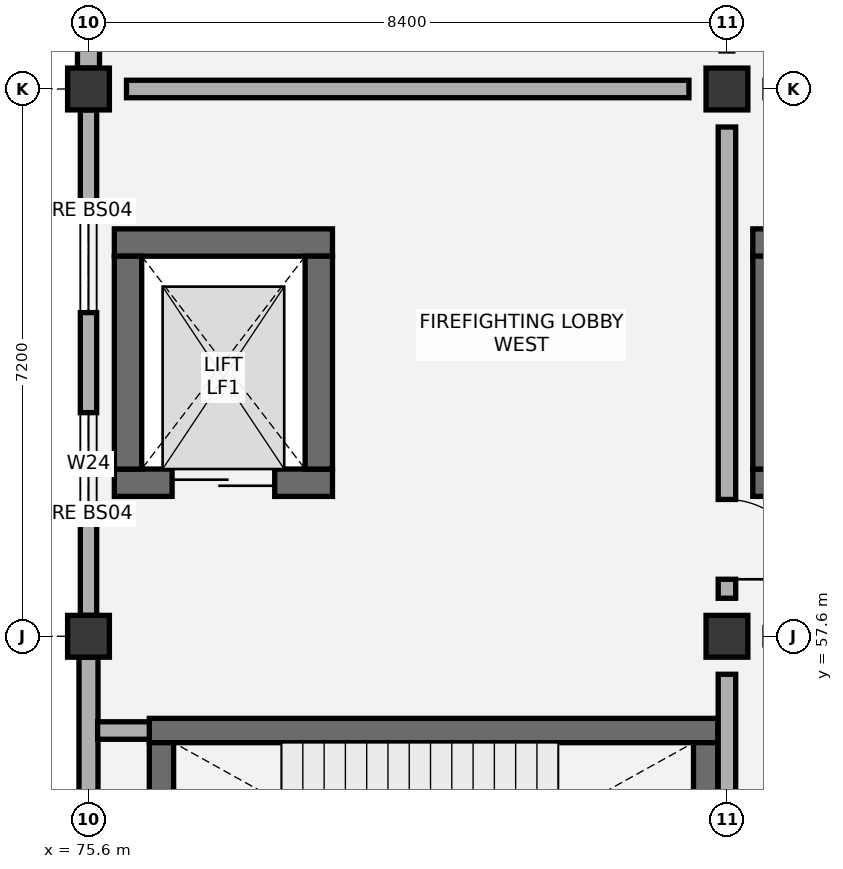
"""IFC4 building model, lengths in metres.
Left out: names, types, materials, properties, quantities, classifications, styles, units other than length and angle.
Written with IfcOpenShell. Run it as: python <this file> out.ifc"""

import sys

from ifc_helpers import new_model, si_unit, direction, frame, frame_2d, origin, origin_2d, place, context, subcontext, project, spatial, rectangle, extrude, element, fill, save


model = new_model("IFC4")
c1 = context("Model", 3, precision=1e-05, world=origin(), true_north=direction((0.0, 1.0)))
c2 = subcontext(c1, "Body", "Model", "MODEL_VIEW")
j1 = project(units=[si_unit("LENGTHUNIT", "METRE"), si_unit("PLANEANGLEUNIT", "RADIAN")], contexts=[c1])
p1 = place(None, origin())
s1 = spatial("IfcSite", under=j1, at=p1, CompositionType="ELEMENT")
p2 = place(p1, origin())
s2 = spatial("IfcBuilding", under=s1, at=p2, CompositionType="ELEMENT")
p3 = place(p2, frame((0.0, 0.0, 60.6)))
s3 = spatial("IfcBuildingStorey", under=s2, at=p3, CompositionType="ELEMENT", Elevation=60.6)
for number, where, z_axis, x_axis in (
    (1, (75.6, 57.6, 0.0), (0.0, 0.0, 1.0), (1.0, 0.0, 0.0)),
    (2, (75.6, 64.8, 0.0), (0.0, 0.0, 1.0), (1.0, 0.0, 0.0)),
    (3, (84.0, 57.6, 0.0), (0.0, 0.0, 1.0), (1.0, 0.0, 0.0)),
    (4, (84.0, 64.8, 0.0), (0.0, 0.0, 1.0), (1.0, 0.0, 0.0)),
):
    element("IfcColumn", number, at=place(p3, frame(where, z_axis=z_axis, x_axis=x_axis)), inside=s3, PredefinedType="COLUMN", context=c2, shape_type="SweptSolid", body=[
        extrude(rectangle(XDim=0.55, YDim=0.55, at=origin_2d()), origin(), (0.0, 0.0, 1.0), 4.2),
    ])
p4 = place(p3, frame((76.4, 56.36, 0.0), z_axis=(0.0, 0.0, 1.0), x_axis=(1.0, 0.0, 0.0)))
e5 = element("IfcWall", 5, at=p4, inside=s3, PredefinedType="SHEAR", context=c2, shape_type="SweptSolid", body=[
    extrude(rectangle(XDim=7.48, YDim=0.32, at=frame_2d((3.74, 0.0))), origin(), (0.0, 0.0, 1.0), 3.95),
])
for number, where, z_axis, x_axis in (
    (6, (76.56, 52.4, 0.0), (0.0, 0.0, 1.0), (0.0, 1.0, 0.0)),
    (7, (83.72, 52.4, 0.0), (0.0, 0.0, 1.0), (0.0, 1.0, 0.0)),
):
    element("IfcWall", number, at=place(p3, frame(where, z_axis=z_axis, x_axis=x_axis)), inside=s3, PredefinedType="SHEAR", context=c2, shape_type="SweptSolid", body=[
        extrude(rectangle(XDim=3.8, YDim=0.32, at=frame_2d((1.9, 0.0))), origin(), (0.0, 0.0, 1.0), 3.95),
    ])
p5 = place(p3, frame((75.94, 62.78, 0.0), z_axis=(0.0, 0.0, 1.0), x_axis=(1.0, 0.0, 0.0)))
e8 = element("IfcWall", 8, at=p5, inside=s3, PredefinedType="SHEAR", context=c2, shape_type="SweptSolid", body=[
    extrude(rectangle(XDim=2.87, YDim=0.36, at=frame_2d((1.435, 0.0))), origin(), (0.0, 0.0, 1.0), 3.95),
])
p6 = place(p3, frame((75.94, 59.62, 0.0), z_axis=(0.0, 0.0, 1.0), x_axis=(1.0, 0.0, 0.0)))
e9 = element("IfcWall", 9, at=p6, inside=s3, PredefinedType="SHEAR", context=c2, shape_type="SweptSolid", body=[
    extrude(rectangle(XDim=2.87, YDim=0.36, at=frame_2d((1.435, 0.0))), origin(), (0.0, 0.0, 1.0), 3.95),
])
p7 = place(p6, frame((0.76, 0.0, 0.0)))
e10 = element("IfcOpeningElement", 10, at=p7, cuts=e9, PredefinedType="OPENING", context=c2, shape_type="SweptSolid", body=[
    extrude(rectangle(XDim=1.35, YDim=2.2, at=frame_2d((0.675, 1.1))), frame((0.0, 0.19, 0.0), z_axis=(0.0, -1.0, 0.0), x_axis=(1.0, 0.0, 0.0)), (0.0, 0.0, 1.0), 0.38),
])
for number, where, z_axis, x_axis in (
    (11, (76.12, 59.8, 0.0), (0.0, 0.0, 1.0), (0.0, 1.0, 0.0)),
    (12, (78.63, 59.8, 0.0), (0.0, 0.0, 1.0), (0.0, 1.0, 0.0)),
):
    element("IfcWall", number, at=place(p3, frame(where, z_axis=z_axis, x_axis=x_axis)), inside=s3, PredefinedType="SHEAR", context=c2, shape_type="SweptSolid", body=[
        extrude(rectangle(XDim=2.8, YDim=0.36, at=frame_2d((1.4, 0.0))), origin(), (0.0, 0.0, 1.0), 3.95),
    ])
p8 = place(p3, frame((84.34, 62.78, 0.0), z_axis=(0.0, 0.0, 1.0), x_axis=(1.0, 0.0, 0.0)))
e13 = element("IfcWall", 13, at=p8, inside=s3, PredefinedType="SHEAR", context=c2, shape_type="SweptSolid", body=[
    extrude(rectangle(XDim=7.77, YDim=0.36, at=frame_2d((3.885, 0.0))), origin(), (0.0, 0.0, 1.0), 3.95),
])
p9 = place(p3, frame((84.34, 59.62, 0.0), z_axis=(0.0, 0.0, 1.0), x_axis=(1.0, 0.0, 0.0)))
e14 = element("IfcWall", 14, at=p9, inside=s3, PredefinedType="SHEAR", context=c2, shape_type="SweptSolid", body=[
    extrude(rectangle(XDim=2.66, YDim=0.36, at=frame_2d((1.33, 0.0))), origin(), (0.0, 0.0, 1.0), 3.95),
])
p10 = place(p9, frame((0.78, 0.0, 0.0)))
e15 = element("IfcOpeningElement", 15, at=p10, cuts=e14, PredefinedType="OPENING", context=c2, shape_type="SweptSolid", body=[
    extrude(rectangle(XDim=1.1, YDim=2.15, at=frame_2d((0.55, 1.075))), frame((0.0, 0.19, 0.0), z_axis=(0.0, -1.0, 0.0), x_axis=(1.0, 0.0, 0.0)), (0.0, 0.0, 1.0), 0.38),
])
p11 = place(p3, frame((84.52, 59.8, 0.0), z_axis=(0.0, 0.0, 1.0), x_axis=(0.0, 1.0, 0.0)))
e16 = element("IfcWall", 16, at=p11, inside=s3, PredefinedType="SHEAR", context=c2, shape_type="SweptSolid", body=[
    extrude(rectangle(XDim=2.8, YDim=0.36, at=frame_2d((1.4, 0.0))), origin(), (0.0, 0.0, 1.0), 3.95),
])
p12 = place(p3, frame((75.6, 50.675, 0.0), z_axis=(0.0, 0.0, 1.0), x_axis=(0.0, 1.0, 0.0)))
e17 = element("IfcWall", 17, at=p12, inside=s3, PredefinedType="SOLIDWALL", context=c2, shape_type="SweptSolid", body=[
    extrude(rectangle(XDim=6.65, YDim=0.25, at=frame_2d((3.325, 0.0))), origin(), (0.0, 0.0, 1.0), 3.395),
])
p13 = place(p3, frame((75.6, 57.875, 0.0), z_axis=(0.0, 0.0, 1.0), x_axis=(0.0, 1.0, 0.0)))
e18 = element("IfcWall", 18, at=p13, inside=s3, PredefinedType="SOLIDWALL", context=c2, shape_type="SweptSolid", body=[
    extrude(rectangle(XDim=6.65, YDim=0.215, at=frame_2d((3.325, 0.0))), origin(), (0.0, 0.0, 1.0), 3.395),
])
p14 = place(p13, frame((1.317, 0.0, 0.95)))
e19 = element("IfcOpeningElement", 19, at=p14, cuts=e18, PredefinedType="OPENING", context=c2, shape_type="SweptSolid", body=[
    extrude(rectangle(XDim=1.35, YDim=1.65, at=frame_2d((0.675, 0.825))), frame((0.0, 0.117, 0.0), z_axis=(0.0, -1.0, 0.0), x_axis=(1.0, 0.0, 0.0)), (0.0, 0.0, 1.0), 0.235),
])
p15 = place(p13, frame((3.983, 0.0, 0.95)))
e20 = element("IfcOpeningElement", 20, at=p15, cuts=e18, PredefinedType="OPENING", context=c2, shape_type="SweptSolid", body=[
    extrude(rectangle(XDim=1.35, YDim=1.65, at=frame_2d((0.675, 0.825))), frame((0.0, 0.117, 0.0), z_axis=(0.0, -1.0, 0.0), x_axis=(1.0, 0.0, 0.0)), (0.0, 0.0, 1.0), 0.235),
])
p16 = place(p3, frame((75.6, 65.075, 0.0), z_axis=(0.0, 0.0, 1.0), x_axis=(0.0, 1.0, 0.0)))
e21 = element("IfcWall", 21, at=p16, inside=s3, PredefinedType="SOLIDWALL", context=c2, shape_type="SweptSolid", body=[
    extrude(rectangle(XDim=6.65, YDim=0.29, at=frame_2d((3.325, 0.0))), origin(), (0.0, 0.0, 1.0), 3.445),
])
p17 = place(p16, frame((1.417, 0.0, 0.95)))
e22 = element("IfcOpeningElement", 22, at=p17, cuts=e21, PredefinedType="OPENING", context=c2, shape_type="SweptSolid", body=[
    extrude(rectangle(XDim=1.2, YDim=1.5, at=frame_2d((0.6, 0.75))), frame((0.0, 0.155, 0.0), z_axis=(0.0, -1.0, 0.0), x_axis=(1.0, 0.0, 0.0)), (0.0, 0.0, 1.0), 0.31),
])
p18 = place(p16, frame((4.033, 0.0, 0.95)))
e23 = element("IfcOpeningElement", 23, at=p18, cuts=e21, PredefinedType="OPENING", context=c2, shape_type="SweptSolid", body=[
    extrude(rectangle(XDim=1.2, YDim=1.5, at=frame_2d((0.6, 0.75))), frame((0.0, 0.155, 0.0), z_axis=(0.0, -1.0, 0.0), x_axis=(1.0, 0.0, 0.0)), (0.0, 0.0, 1.0), 0.31),
])
p19 = place(p3, frame((84.0, 50.9, 0.0), z_axis=(0.0, 0.0, 1.0), x_axis=(0.0, 1.0, 0.0)))
e24 = element("IfcWall", 24, at=p19, inside=s3, PredefinedType="PARTITIONING", context=c2, shape_type="SweptSolid", body=[
    extrude(rectangle(XDim=6.2, YDim=0.23, at=frame_2d((3.1, 0.0))), origin(), (0.0, 0.0, 1.0), 3.545),
])
p20 = place(p19, frame((0.05, 0.0, 0.0)))
e25 = element("IfcOpeningElement", 25, at=p20, cuts=e24, PredefinedType="OPENING", context=c2, shape_type="SweptSolid", body=[
    extrude(rectangle(XDim=1.05, YDim=2.15, at=frame_2d((0.525, 1.075))), frame((0.0, 0.125, 0.0), z_axis=(0.0, -1.0, 0.0), x_axis=(1.0, 0.0, 0.0)), (0.0, 0.0, 1.0), 0.25),
])
p21 = place(p3, frame((75.72, 56.36, 0.0), z_axis=(0.0, 0.0, 1.0), x_axis=(1.0, 0.0, 0.0)))
e26 = element("IfcWall", 26, at=p21, inside=s3, PredefinedType="PARTITIONING", context=c2, shape_type="SweptSolid", body=[
    extrude(rectangle(XDim=0.68, YDim=0.23, at=frame_2d((0.34, 0.0))), origin(), (0.0, 0.0, 1.0), 3.95),
])
p22 = place(p3, frame((84.0, 58.1, 0.0), z_axis=(0.0, 0.0, 1.0), x_axis=(0.0, 1.0, 0.0)))
e27 = element("IfcWall", 27, at=p22, inside=s3, PredefinedType="PARTITIONING", context=c2, shape_type="SweptSolid", body=[
    extrude(rectangle(XDim=6.2, YDim=0.23, at=frame_2d((3.1, 0.0))), origin(), (0.0, 0.0, 1.0), 3.445),
])
p23 = place(p22, frame((0.25, 0.0, 0.0)))
e28 = element("IfcOpeningElement", 28, at=p23, cuts=e27, PredefinedType="OPENING", context=c2, shape_type="SweptSolid", body=[
    extrude(rectangle(XDim=1.05, YDim=2.15, at=frame_2d((0.525, 1.075))), frame((0.0, 0.125, 0.0), z_axis=(0.0, -1.0, 0.0), x_axis=(1.0, 0.0, 0.0)), (0.0, 0.0, 1.0), 0.25),
])
p24 = place(p3, frame((76.1, 64.8, 0.0), z_axis=(0.0, 0.0, 1.0), x_axis=(1.0, 0.0, 0.0)))
e29 = element("IfcWall", 29, at=p24, inside=s3, PredefinedType="PARTITIONING", context=c2, shape_type="SweptSolid", body=[
    extrude(rectangle(XDim=7.4, YDim=0.23, at=frame_2d((3.7, 0.0))), origin(), (0.0, 0.0, 1.0), 3.545),
])
p25 = place(p14, origin())
e30 = element("IfcWindow", 30, at=p25, inside=s3, PartitioningType="SINGLE_PANEL", PredefinedType="WINDOW", context=c2, shape_type="SweptSolid", body=[
    extrude(rectangle(XDim=1.35, YDim=1.65, at=frame_2d((0.675, 0.825))), frame((0.0, 0.03, 0.0), z_axis=(0.0, -1.0, 0.0), x_axis=(1.0, 0.0, 0.0)), (0.0, 0.0, 1.0), 0.06),
])
fill(e19, e30)
p26 = place(p15, origin())
e31 = element("IfcWindow", 31, at=p26, inside=s3, PartitioningType="SINGLE_PANEL", PredefinedType="WINDOW", context=c2, shape_type="SweptSolid", body=[
    extrude(rectangle(XDim=1.35, YDim=1.65, at=frame_2d((0.675, 0.825))), frame((0.0, 0.03, 0.0), z_axis=(0.0, -1.0, 0.0), x_axis=(1.0, 0.0, 0.0)), (0.0, 0.0, 1.0), 0.06),
])
fill(e20, e31)
p27 = place(p7, origin())
e32 = element("IfcDoor", 32, at=p27, inside=s3, OperationType="DOUBLE_DOOR_SLIDING", PredefinedType="DOOR", context=c2, shape_type="SweptSolid", body=[
    extrude(rectangle(XDim=1.35, YDim=2.2, at=frame_2d((0.675, 1.1))), frame((0.0, 0.025, 0.0), z_axis=(0.0, -1.0, 0.0), x_axis=(1.0, 0.0, 0.0)), (0.0, 0.0, 1.0), 0.05),
])
fill(e10, e32)
p28 = place(p23, frame((1.05, 0.0, 0.0), z_axis=(0.0, 0.0, 1.0), x_axis=(-1.0, 0.0, 0.0)))
e33 = element("IfcDoor", 33, at=p28, inside=s3, OperationType="SINGLE_SWING_RIGHT", PredefinedType="DOOR", context=c2, shape_type="SweptSolid", body=[
    extrude(rectangle(XDim=1.05, YDim=2.15, at=frame_2d((0.525, 1.075))), frame((0.0, 0.025, 0.0), z_axis=(0.0, -1.0, 0.0), x_axis=(1.0, 0.0, 0.0)), (0.0, 0.0, 1.0), 0.05),
])
fill(e28, e33)
save(model, sys.argv[1])
